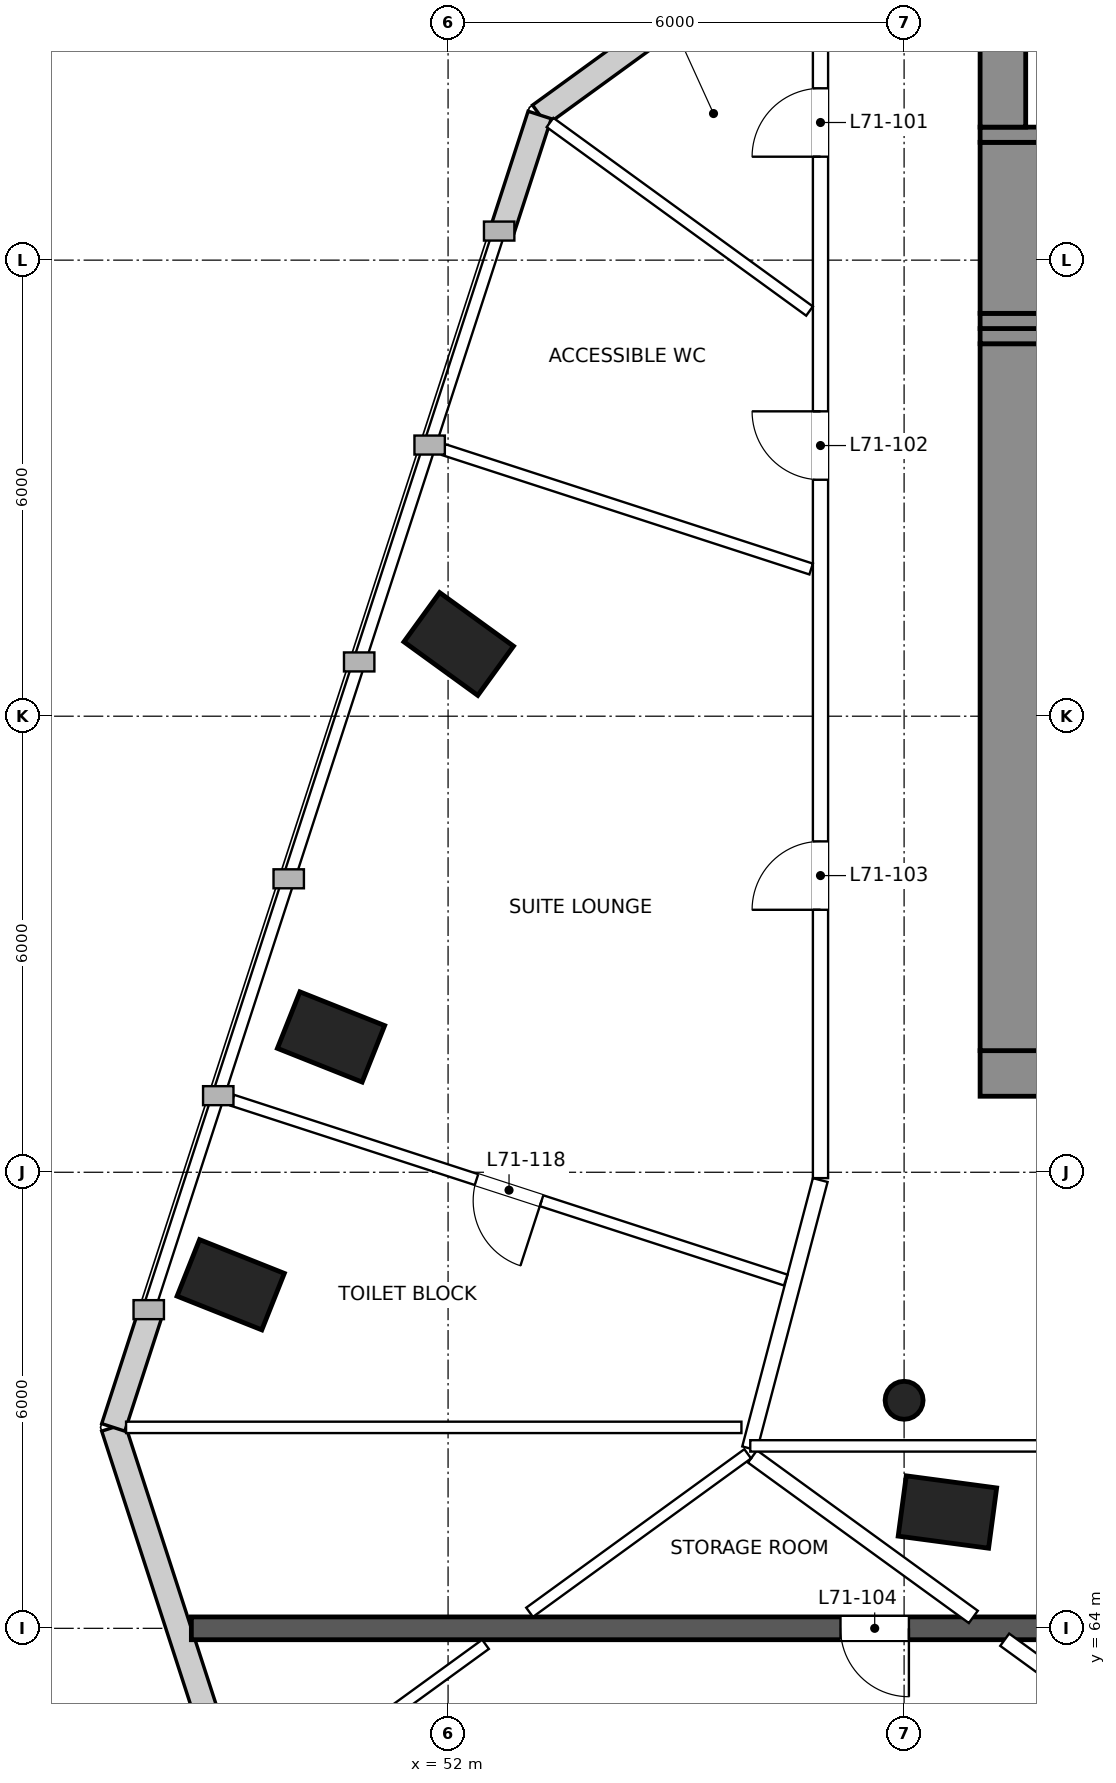
"""IFC4 building model, lengths in metres.
Left out: names, types, materials, properties, quantities, classifications, styles, units other than length and angle.
Written with IfcOpenShell. Run it as: python <this file> out.ifc"""

import sys

from ifc_helpers import new_model, si_unit, direction, frame, frame_2d, origin, origin_2d, place, context, subcontext, project, spatial, rectangle, circle, extrude, element, fill, save


model = new_model("IFC4")
c1 = context("Model", 3, precision=1e-05, world=origin(), true_north=direction((0.0, 1.0)))
c2 = subcontext(c1, "Body", "Model", "MODEL_VIEW")
j1 = project(units=[si_unit("LENGTHUNIT", "METRE"), si_unit("PLANEANGLEUNIT", "RADIAN")], contexts=[c1])
p1 = place(None, origin())
s1 = spatial("IfcSite", under=j1, at=p1, CompositionType="ELEMENT")
p2 = place(p1, origin())
s2 = spatial("IfcBuilding", under=s1, at=p2, CompositionType="ELEMENT")
p3 = place(p2, frame((0.0, 0.0, 300.1)))
s3 = spatial("IfcBuildingStorey", under=s2, at=p3, CompositionType="ELEMENT", Elevation=300.1)
for number, where, z_axis, x_axis in (
    (1, (52.14, 76.95, 0.0), (0.0, 0.0, 1.0), (0.587, 0.81, 0.0)),
    (2, (50.46, 71.78, 0.0), (0.0, 0.0, 1.0), (0.37, 0.929, 0.0)),
    (3, (49.14, 68.52, 0.0), (0.0, 0.0, 1.0), (0.37, 0.929, 0.0)),
    (4, (58.57, 65.53, 0.0), (0.0, 0.0, 1.0), (0.133, 0.991, 0.0)),
):
    element("IfcColumn", number, at=place(p3, frame(where, z_axis=z_axis, x_axis=x_axis)), inside=s3, PredefinedType="COLUMN", context=c2, shape_type="SweptSolid", body=[
        extrude(rectangle(XDim=0.8, YDim=1.2, at=origin_2d()), origin(), (0.0, 0.0, 1.0), 6.0),
    ])
p4 = place(p3, frame((58.0, 67.0, 0.0), z_axis=(0.0, 0.0, 1.0), x_axis=(1.0, 0.0, 0.0)))
e5 = element("IfcColumn", 5, at=p4, inside=s3, PredefinedType="COLUMN", context=c2, shape_type="SweptSolid", body=[
    extrude(circle(Radius=0.25, at=origin_2d()), origin(), (0.0, 0.0, 1.0), 6.0),
])
p5 = place(p3, frame((47.595, 66.644, 0.0), z_axis=(0.0, 0.0, 1.0), x_axis=(0.30900814357, -0.951059392051, 0.0)))
e6 = element("IfcWall", 6, at=p5, inside=s3, PredefinedType="SOLIDWALL", context=c2, shape_type="SweptSolid", body=[
    extrude(rectangle(XDim=5.455, YDim=0.32, at=frame_2d((2.727, 0.0))), origin(), (0.0, 0.0, 1.0), 5.7),
])
p6 = place(p3, frame((54.697, 84.993, 0.0), z_axis=(0.0, 0.0, 1.0), x_axis=(-0.808999469603, -0.587809372315, 0.0)))
e7 = element("IfcWall", 7, at=p6, inside=s3, PredefinedType="SOLIDWALL", context=c2, shape_type="SweptSolid", body=[
    extrude(rectangle(XDim=1.843, YDim=0.32, at=frame_2d((0.922, 0.0))), origin(), (0.0, 0.0, 1.0), 5.7),
])
for number, where, z_axis, x_axis in (
    (8, (53.205, 83.91, 0.0), (0.0, 0.0, 1.0), (-0.309, -0.951, 0.0)),
    (9, (48.083, 68.144, 0.0), (0.0, 0.0, 1.0), (-0.309, -0.951, 0.0)),
):
    element("IfcWall", number, at=place(p3, frame(where, z_axis=z_axis, x_axis=x_axis)), inside=s3, PredefinedType="SOLIDWALL", context=c2, shape_type="SweptSolid", body=[
        extrude(rectangle(XDim=1.577, YDim=0.32, at=frame_2d((0.789, 0.0))), origin(), (0.0, 0.0, 1.0), 5.7),
    ])
p7 = place(p3, frame((59.0, 71.3, 0.0), z_axis=(0.0, 0.0, 1.0), x_axis=(1.0, 0.0, 0.0)))
e10 = element("IfcWall", 10, at=p7, inside=s3, PredefinedType="SHEAR", context=c2, shape_type="SweptSolid", body=[
    extrude(rectangle(XDim=22.0, YDim=0.6, at=frame_2d((11.0, 0.0))), origin(), (0.0, 0.0, 1.0), 6.0),
])
p8 = place(p7, frame((2.025, 0.0, 0.0)))
e11 = element("IfcOpeningElement", 11, at=p8, cuts=e10, PredefinedType="OPENING", context=c2, shape_type="SweptSolid", body=[
    extrude(rectangle(XDim=1.2, YDim=2.1, at=frame_2d((0.6, 1.05))), frame((0.0, 0.31, 0.0), z_axis=(0.0, -1.0, 0.0), x_axis=(1.0, 0.0, 0.0)), (0.0, 0.0, 1.0), 0.62),
])
p9 = place(p7, frame((18.775, 0.0, 0.0)))
e12 = element("IfcOpeningElement", 12, at=p9, cuts=e10, PredefinedType="OPENING", context=c2, shape_type="SweptSolid", body=[
    extrude(rectangle(XDim=1.2, YDim=2.1, at=frame_2d((0.6, 1.05))), frame((0.0, 0.31, 0.0), z_axis=(0.0, -1.0, 0.0), x_axis=(1.0, 0.0, 0.0)), (0.0, 0.0, 1.0), 0.62),
])
p10 = place(p7, frame((10.0, 0.0, 0.0)))
e13 = element("IfcOpeningElement", 13, at=p10, cuts=e10, PredefinedType="OPENING", context=c2, shape_type="SweptSolid", body=[
    extrude(rectangle(XDim=2.0, YDim=2.1, at=frame_2d((1.0, 1.05))), frame((0.0, 0.31, 0.0), z_axis=(0.0, -1.0, 0.0), x_axis=(1.0, 0.0, 0.0)), (0.0, 0.0, 1.0), 0.62),
])
p11 = place(p3, frame((59.6, 71.6, 0.0), z_axis=(0.0, 0.0, 1.0), x_axis=(0.0, 1.0, 0.0)))
e14 = element("IfcWall", 14, at=p11, inside=s3, PredefinedType="SHEAR", context=c2, shape_type="SweptSolid", body=[
    extrude(rectangle(XDim=9.3, YDim=1.2, at=frame_2d((4.65, 0.0))), origin(), (0.0, 0.0, 1.0), 6.0),
])
p12 = place(p3, frame((59.0, 81.0, 0.0), z_axis=(0.0, 0.0, 1.0), x_axis=(1.0, 0.0, 0.0)))
e15 = element("IfcWall", 15, at=p12, inside=s3, PredefinedType="SHEAR", context=c2, shape_type="SweptSolid", body=[
    extrude(rectangle(XDim=22.0, YDim=0.2, at=frame_2d((11.0, 0.0))), origin(), (0.0, 0.0, 1.0), 6.0),
])
p13 = place(p12, frame((10.035, 0.0, 0.0)))
e16 = element("IfcOpeningElement", 16, at=p13, cuts=e15, PredefinedType="OPENING", context=c2, shape_type="SweptSolid", body=[
    extrude(rectangle(XDim=0.9, YDim=2.1, at=frame_2d((0.45, 1.05))), frame((0.0, 0.11, 0.0), z_axis=(0.0, -1.0, 0.0), x_axis=(1.0, 0.0, 0.0)), (0.0, 0.0, 1.0), 0.22),
])
p14 = place(p12, frame((12.685, 0.0, 0.0)))
e17 = element("IfcOpeningElement", 17, at=p14, cuts=e15, PredefinedType="OPENING", context=c2, shape_type="SweptSolid", body=[
    extrude(rectangle(XDim=0.9, YDim=2.1, at=frame_2d((0.45, 1.05))), frame((0.0, 0.11, 0.0), z_axis=(0.0, -1.0, 0.0), x_axis=(1.0, 0.0, 0.0)), (0.0, 0.0, 1.0), 0.22),
])
p15 = place(p3, frame((59.0, 81.2, 0.0), z_axis=(0.0, 0.0, 1.0), x_axis=(1.0, 0.0, 0.0)))
e18 = element("IfcWall", 18, at=p15, inside=s3, PredefinedType="SHEAR", context=c2, shape_type="SweptSolid", body=[
    extrude(rectangle(XDim=4.45, YDim=0.2, at=frame_2d((2.225, 0.0))), origin(), (0.0, 0.0, 1.0), 6.0),
])
p16 = place(p3, frame((59.7, 81.3, 0.0), z_axis=(0.0, 0.0, 1.0), x_axis=(0.0, 1.0, 0.0)))
e19 = element("IfcWall", 19, at=p16, inside=s3, PredefinedType="SHEAR", context=c2, shape_type="SweptSolid", body=[
    extrude(rectangle(XDim=2.25, YDim=1.4, at=frame_2d((1.125, 0.0))), origin(), (0.0, 0.0, 1.0), 6.0),
])
p17 = place(p3, frame((59.0, 83.65, 0.0), z_axis=(0.0, 0.0, 1.0), x_axis=(1.0, 0.0, 0.0)))
e20 = element("IfcWall", 20, at=p17, inside=s3, PredefinedType="SHEAR", context=c2, shape_type="SweptSolid", body=[
    extrude(rectangle(XDim=22.0, YDim=0.2, at=frame_2d((11.0, 0.0))), origin(), (0.0, 0.0, 1.0), 6.0),
])
p18 = place(p17, frame((5.125, 0.0, 0.0)))
e21 = element("IfcOpeningElement", 21, at=p18, cuts=e20, PredefinedType="OPENING", context=c2, shape_type="SweptSolid", body=[
    extrude(rectangle(XDim=1.1, YDim=2.1, at=frame_2d((0.55, 1.05))), frame((0.0, 0.11, 0.0), z_axis=(0.0, -1.0, 0.0), x_axis=(1.0, 0.0, 0.0)), (0.0, 0.0, 1.0), 0.22),
])
p19 = place(p17, frame((7.65, 0.0, 0.0)))
e22 = element("IfcOpeningElement", 22, at=p19, cuts=e20, PredefinedType="OPENING", context=c2, shape_type="SweptSolid", body=[
    extrude(rectangle(XDim=1.1, YDim=2.1, at=frame_2d((0.55, 1.05))), frame((0.0, 0.11, 0.0), z_axis=(0.0, -1.0, 0.0), x_axis=(1.0, 0.0, 0.0)), (0.0, 0.0, 1.0), 0.22),
])
p20 = place(p17, frame((18.775, 0.0, 0.0)))
e23 = element("IfcOpeningElement", 23, at=p20, cuts=e20, PredefinedType="OPENING", context=c2, shape_type="SweptSolid", body=[
    extrude(rectangle(XDim=1.2, YDim=2.1, at=frame_2d((0.6, 1.05))), frame((0.0, 0.11, 0.0), z_axis=(0.0, -1.0, 0.0), x_axis=(1.0, 0.0, 0.0)), (0.0, 0.0, 1.0), 0.22),
])
p21 = place(p17, frame((2.075, 0.0, 0.0)))
e24 = element("IfcOpeningElement", 24, at=p21, cuts=e20, PredefinedType="OPENING", context=c2, shape_type="SweptSolid", body=[
    extrude(rectangle(XDim=1.1, YDim=2.1, at=frame_2d((0.55, 1.05))), frame((0.0, 0.11, 0.0), z_axis=(0.0, -1.0, 0.0), x_axis=(1.0, 0.0, 0.0)), (0.0, 0.0, 1.0), 0.22),
])
p22 = place(p3, frame((59.3, 83.75, 0.0), z_axis=(0.0, 0.0, 1.0), x_axis=(0.0, 1.0, 0.0)))
e25 = element("IfcWall", 25, at=p22, inside=s3, PredefinedType="SHEAR", context=c2, shape_type="SweptSolid", body=[
    extrude(rectangle(XDim=3.65, YDim=0.6, at=frame_2d((1.825, 0.0))), origin(), (0.0, 0.0, 1.0), 6.0),
])
p23 = place(p22, frame((1.275, 0.0, 0.0)))
e26 = element("IfcOpeningElement", 26, at=p23, cuts=e25, PredefinedType="OPENING", context=c2, shape_type="SweptSolid", body=[
    extrude(rectangle(XDim=1.1, YDim=2.1, at=frame_2d((0.55, 1.05))), frame((0.0, 0.31, 0.0), z_axis=(0.0, -1.0, 0.0), x_axis=(1.0, 0.0, 0.0)), (0.0, 0.0, 1.0), 0.62),
])
p24 = place(p3, frame((48.622, 64.0, 0.0), z_axis=(0.0, 0.0, 1.0), x_axis=(1.0, 0.0, 0.0)))
e27 = element("IfcWall", 27, at=p24, inside=s3, PredefinedType="PARTITIONING", context=c2, shape_type="SweptSolid", body=[
    extrude(rectangle(XDim=42.755, YDim=0.3, at=frame_2d((21.378, 0.0))), origin(), (0.0, 0.0, 1.0), 5.2),
])
p25 = place(p24, frame((8.541, 0.0, 0.0)))
e28 = element("IfcOpeningElement", 28, at=p25, cuts=e27, PredefinedType="OPENING", context=c2, shape_type="SweptSolid", body=[
    extrude(rectangle(XDim=0.9, YDim=2.1, at=frame_2d((0.45, 1.05))), frame((0.0, 0.16, 0.0), z_axis=(0.0, -1.0, 0.0), x_axis=(1.0, 0.0, 0.0)), (0.0, 0.0, 1.0), 0.32),
])
p26 = place(p24, frame((14.936, 0.0, 0.0)))
e29 = element("IfcOpeningElement", 29, at=p26, cuts=e27, PredefinedType="OPENING", context=c2, shape_type="SweptSolid", body=[
    extrude(rectangle(XDim=2.0, YDim=2.1, at=frame_2d((1.0, 1.05))), frame((0.0, 0.16, 0.0), z_axis=(0.0, -1.0, 0.0), x_axis=(1.0, 0.0, 0.0)), (0.0, 0.0, 1.0), 0.32),
])
p27 = place(p24, frame((25.819, 0.0, 0.0)))
e30 = element("IfcOpeningElement", 30, at=p27, cuts=e27, PredefinedType="OPENING", context=c2, shape_type="SweptSolid", body=[
    extrude(rectangle(XDim=2.0, YDim=2.1, at=frame_2d((1.0, 1.05))), frame((0.0, 0.16, 0.0), z_axis=(0.0, -1.0, 0.0), x_axis=(1.0, 0.0, 0.0)), (0.0, 0.0, 1.0), 0.32),
])
p28 = place(p3, frame((62.05, 61.869, 0.0), z_axis=(0.0, 0.0, 1.0), x_axis=(-0.809017922832, 0.587783974379, 0.0)))
e31 = element("IfcWall", 31, at=p28, inside=s3, PredefinedType="PARTITIONING", context=c2, shape_type="SweptSolid", body=[
    extrude(rectangle(XDim=3.37, YDim=0.2, at=frame_2d((1.685, 0.0))), origin(), (0.0, 0.0, 1.0), 5.7),
])
p29 = place(p28, frame((1.235, 0.0, 0.0)))
e32 = element("IfcOpeningElement", 32, at=p29, cuts=e31, PredefinedType="OPENING", context=c2, shape_type="SweptSolid", body=[
    extrude(rectangle(XDim=0.9, YDim=2.1, at=frame_2d((0.45, 1.05))), frame((0.0, 0.11, 0.0), z_axis=(0.0, -1.0, 0.0), x_axis=(1.0, 0.0, 0.0)), (0.0, 0.0, 1.0), 0.22),
])
p30 = place(p3, frame((58.911, 64.15, 0.0), z_axis=(0.0, 0.0, 1.0), x_axis=(-0.809026987684, 0.587771497437, 0.0)))
e33 = element("IfcWall", 33, at=p30, inside=s3, PredefinedType="PARTITIONING", context=c2, shape_type="SweptSolid", body=[
    extrude(rectangle(XDim=3.592, YDim=0.2, at=frame_2d((1.796, 0.0))), origin(), (0.0, 0.0, 1.0), 5.2),
])
p31 = place(p3, frame((55.967, 66.367, 0.0), z_axis=(0.0, 0.0, 1.0), x_axis=(0.254618397002, 0.967041608158, 0.0)))
e34 = element("IfcWall", 34, at=p31, inside=s3, PredefinedType="PARTITIONING", context=c2, shape_type="SweptSolid", body=[
    extrude(rectangle(XDim=3.65, YDim=0.2, at=frame_2d((1.825, 0.0))), origin(), (0.0, 0.0, 1.0), 5.7),
])
p32 = place(p3, frame((56.9, 69.923, 0.0), z_axis=(0.0, 0.0, 1.0), x_axis=(0.0, 1.0, 0.0)))
e35 = element("IfcWall", 35, at=p32, inside=s3, PredefinedType="PARTITIONING", context=c2, shape_type="SweptSolid", body=[
    extrude(rectangle(XDim=16.614, YDim=0.2, at=frame_2d((8.307, 0.0))), origin(), (0.0, 0.0, 1.0), 5.25),
])
p33 = place(p32, frame((13.438, 0.0, 0.0)))
e36 = element("IfcOpeningElement", 36, at=p33, cuts=e35, PredefinedType="OPENING", context=c2, shape_type="SweptSolid", body=[
    extrude(rectangle(XDim=0.9, YDim=2.1, at=frame_2d((0.45, 1.05))), frame((0.0, 0.11, 0.0), z_axis=(0.0, -1.0, 0.0), x_axis=(1.0, 0.0, 0.0)), (0.0, 0.0, 1.0), 0.22),
])
p34 = place(p32, frame((9.188, 0.0, 0.0)))
e37 = element("IfcOpeningElement", 37, at=p34, cuts=e35, PredefinedType="OPENING", context=c2, shape_type="SweptSolid", body=[
    extrude(rectangle(XDim=0.9, YDim=2.1, at=frame_2d((0.45, 1.05))), frame((0.0, 0.11, 0.0), z_axis=(0.0, -1.0, 0.0), x_axis=(1.0, 0.0, 0.0)), (0.0, 0.0, 1.0), 0.22),
])
p35 = place(p32, frame((3.53, 0.0, 0.0)))
e38 = element("IfcOpeningElement", 38, at=p35, cuts=e35, PredefinedType="OPENING", context=c2, shape_type="SweptSolid", body=[
    extrude(rectangle(XDim=0.9, YDim=2.1, at=frame_2d((0.45, 1.05))), frame((0.0, 0.11, 0.0), z_axis=(0.0, -1.0, 0.0), x_axis=(1.0, 0.0, 0.0)), (0.0, 0.0, 1.0), 0.22),
])
p36 = place(p3, frame((53.341, 83.811, 0.0), z_axis=(0.0, 0.0, 1.0), x_axis=(0.809028651685, -0.587769207048, 0.0)))
e39 = element("IfcWall", 39, at=p36, inside=s3, PredefinedType="PARTITIONING", context=c2, shape_type="SweptSolid", body=[
    extrude(rectangle(XDim=4.22, YDim=0.15, at=frame_2d((2.11, 0.0))), origin(), (0.0, 0.0, 1.0), 5.7),
])
p37 = place(p3, frame((47.763, 66.644, 0.0), z_axis=(0.0, 0.0, 1.0), x_axis=(1.0, 0.0, 0.0)))
e40 = element("IfcWall", 40, at=p37, inside=s3, PredefinedType="PARTITIONING", context=c2, shape_type="SweptSolid", body=[
    extrude(rectangle(XDim=8.096, YDim=0.15, at=frame_2d((4.048, 0.0))), origin(), (0.0, 0.0, 1.0), 5.25),
])
p38 = place(p3, frame((49.417, 61.555, 0.0), z_axis=(0.0, 0.0, 1.0), x_axis=(0.808994279643, 0.587816515168, 0.0)))
e41 = element("IfcWall", 41, at=p38, inside=s3, PredefinedType="PARTITIONING", context=c2, shape_type="SweptSolid", body=[
    extrude(rectangle(XDim=3.802, YDim=0.15, at=frame_2d((1.901, 0.0))), origin(), (0.0, 0.0, 1.0), 5.25),
])
p39 = place(p3, frame((53.073, 64.211, 0.0), z_axis=(0.0, 0.0, 1.0), x_axis=(0.809009822352, 0.587795123608, 0.0)))
e42 = element("IfcWall", 42, at=p39, inside=s3, PredefinedType="PARTITIONING", context=c2, shape_type="SweptSolid", body=[
    extrude(rectangle(XDim=3.547, YDim=0.15, at=frame_2d((1.773, 0.0))), origin(), (0.0, 0.0, 1.0), 5.7),
])
p40 = place(p3, frame((51.943, 79.507, 0.0), z_axis=(0.0, 0.0, 1.0), x_axis=(0.951057717188, -0.309013298382, 0.0)))
e43 = element("IfcWall", 43, at=p40, inside=s3, PredefinedType="PARTITIONING", context=c2, shape_type="SweptSolid", body=[
    extrude(rectangle(XDim=5.083, YDim=0.15, at=frame_2d((2.541, 0.0))), origin(), (0.0, 0.0, 1.0), 5.7),
])
p41 = place(p3, frame((49.162, 70.948, 0.0), z_axis=(0.0, 0.0, 1.0), x_axis=(0.951051176094, -0.30903342934, 0.0)))
e44 = element("IfcWall", 44, at=p41, inside=s3, PredefinedType="PARTITIONING", context=c2, shape_type="SweptSolid", body=[
    extrude(rectangle(XDim=7.655, YDim=0.15, at=frame_2d((3.828, 0.0))), origin(), (0.0, 0.0, 1.0), 5.25),
])
p42 = place(p41, frame((3.378, 0.0, 0.0)))
e45 = element("IfcOpeningElement", 45, at=p42, cuts=e44, PredefinedType="OPENING", context=c2, shape_type="SweptSolid", body=[
    extrude(rectangle(XDim=0.9, YDim=2.1, at=frame_2d((0.45, 1.05))), frame((0.0, 0.085, 0.0), z_axis=(0.0, -1.0, 0.0), x_axis=(1.0, 0.0, 0.0)), (0.0, 0.0, 1.0), 0.17),
])
p43 = place(p3, frame((84.024, 66.4, 0.0), z_axis=(0.0, 0.0, 1.0), x_axis=(-1.0, 0.0, 0.0)))
e46 = element("IfcWall", 46, at=p43, inside=s3, PredefinedType="PARTITIONING", context=c2, shape_type="SweptSolid", body=[
    extrude(rectangle(XDim=28.048, YDim=0.15, at=frame_2d((14.024, 0.0))), origin(), (0.0, 0.0, 1.0), 5.7),
])
p44 = place(p43, frame((7.965, 0.0, 0.0)))
e47 = element("IfcOpeningElement", 47, at=p44, cuts=e46, PredefinedType="OPENING", context=c2, shape_type="SweptSolid", body=[
    extrude(rectangle(XDim=1.8, YDim=2.1, at=frame_2d((0.9, 1.05))), frame((0.0, 0.085, 0.0), z_axis=(0.0, -1.0, 0.0), x_axis=(1.0, 0.0, 0.0)), (0.0, 0.0, 1.0), 0.17),
])
p45 = place(p43, frame((18.284, 0.0, 0.0)))
e48 = element("IfcOpeningElement", 48, at=p45, cuts=e46, PredefinedType="OPENING", context=c2, shape_type="SweptSolid", body=[
    extrude(rectangle(XDim=1.8, YDim=2.1, at=frame_2d((0.9, 1.05))), frame((0.0, 0.085, 0.0), z_axis=(0.0, -1.0, 0.0), x_axis=(1.0, 0.0, 0.0)), (0.0, 0.0, 1.0), 0.17),
])
p46 = place(p33, origin())
e49 = element("IfcDoor", 49, at=p46, inside=s3, OperationType="SINGLE_SWING_LEFT", PredefinedType="DOOR", context=c2, shape_type="SweptSolid", body=[
    extrude(rectangle(XDim=0.9, YDim=2.1, at=frame_2d((0.45, 1.05))), frame((0.0, 0.025, 0.0), z_axis=(0.0, -1.0, 0.0), x_axis=(1.0, 0.0, 0.0)), (0.0, 0.0, 1.0), 0.05),
])
fill(e36, e49)
p47 = place(p34, origin())
e50 = element("IfcDoor", 50, at=p47, inside=s3, OperationType="SINGLE_SWING_RIGHT", PredefinedType="DOOR", context=c2, shape_type="SweptSolid", body=[
    extrude(rectangle(XDim=0.9, YDim=2.1, at=frame_2d((0.45, 1.05))), frame((0.0, 0.025, 0.0), z_axis=(0.0, -1.0, 0.0), x_axis=(1.0, 0.0, 0.0)), (0.0, 0.0, 1.0), 0.05),
])
fill(e37, e50)
p48 = place(p35, origin())
e51 = element("IfcDoor", 51, at=p48, inside=s3, OperationType="SINGLE_SWING_LEFT", PredefinedType="DOOR", context=c2, shape_type="SweptSolid", body=[
    extrude(rectangle(XDim=0.9, YDim=2.1, at=frame_2d((0.45, 1.05))), frame((0.0, 0.025, 0.0), z_axis=(0.0, -1.0, 0.0), x_axis=(1.0, 0.0, 0.0)), (0.0, 0.0, 1.0), 0.05),
])
fill(e38, e51)
p49 = place(p25, frame((0.9, 0.0, 0.0), z_axis=(0.0, 0.0, 1.0), x_axis=(-1.0, 0.0, 0.0)))
e52 = element("IfcDoor", 52, at=p49, inside=s3, OperationType="SINGLE_SWING_LEFT", PredefinedType="DOOR", context=c2, shape_type="SweptSolid", body=[
    extrude(rectangle(XDim=0.9, YDim=2.1, at=frame_2d((0.45, 1.05))), frame((0.0, 0.025, 0.0), z_axis=(0.0, -1.0, 0.0), x_axis=(1.0, 0.0, 0.0)), (0.0, 0.0, 1.0), 0.05),
])
fill(e28, e52)
p50 = place(p42, frame((0.9, 0.0, 0.0), z_axis=(0.0, 0.0, 1.0), x_axis=(-1.0, 0.0, 0.0)))
e53 = element("IfcDoor", 53, at=p50, inside=s3, OperationType="SINGLE_SWING_LEFT", PredefinedType="DOOR", context=c2, shape_type="SweptSolid", body=[
    extrude(rectangle(XDim=0.9, YDim=2.1, at=frame_2d((0.45, 1.05))), frame((0.0, 0.025, 0.0), z_axis=(0.0, -1.0, 0.0), x_axis=(1.0, 0.0, 0.0)), (0.0, 0.0, 1.0), 0.05),
])
fill(e45, e53)
save(model, sys.argv[1])
